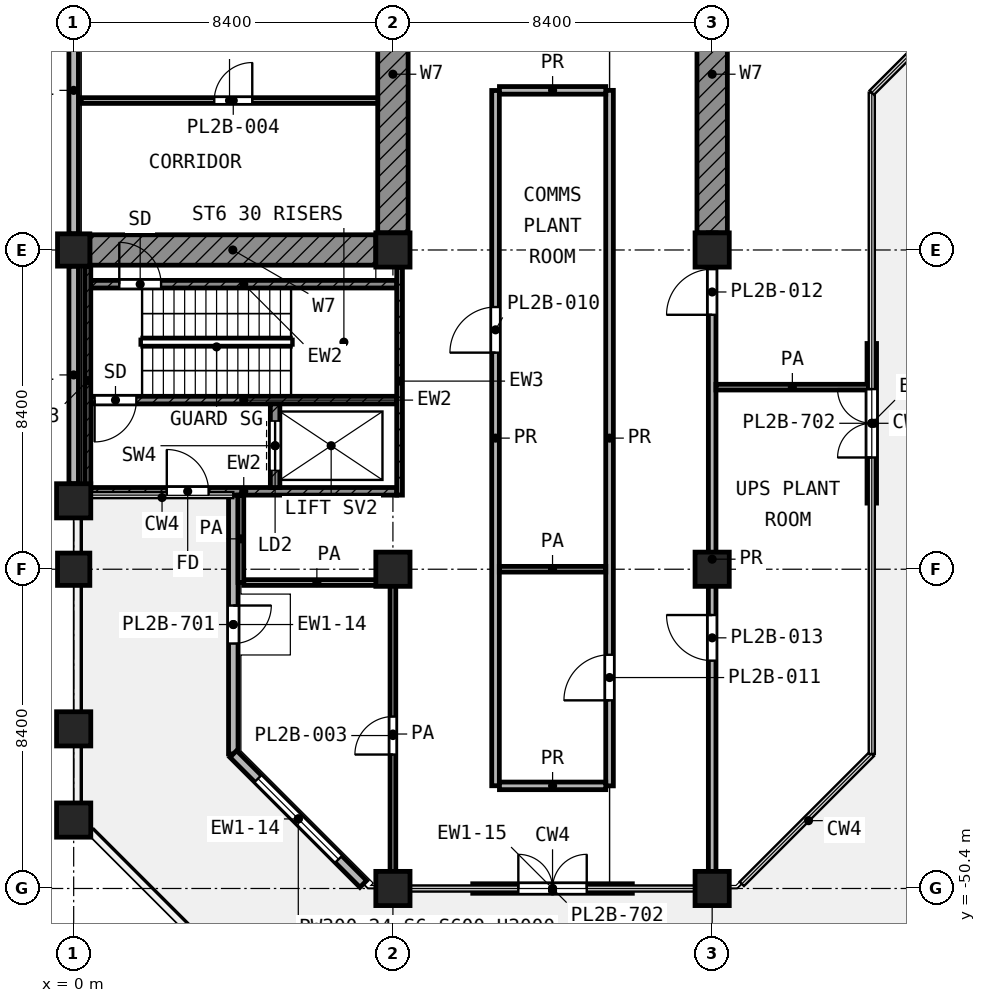
"""IFC4 building model, lengths in metres.
Left out: names, types, materials, properties, quantities, classifications, styles, units other than length and angle.
Written with IfcOpenShell. Run it as: python <this file> out.ifc"""

import sys

from ifc_helpers import new_model, si_unit, direction, frame, frame_2d, origin, origin_2d, place, context, subcontext, project, spatial, rectangle, extrude, element, fill, save


model = new_model("IFC4")
c1 = context("Model", 3, precision=1e-05, world=origin(), true_north=direction((0.0, 1.0)))
c2 = subcontext(c1, "Body", "Model", "MODEL_VIEW")
j1 = project(units=[si_unit("LENGTHUNIT", "METRE"), si_unit("PLANEANGLEUNIT", "RADIAN")], contexts=[c1])
p1 = place(None, origin())
s1 = spatial("IfcSite", under=j1, at=p1, CompositionType="ELEMENT")
p2 = place(p1, origin())
s2 = spatial("IfcBuilding", under=s1, at=p2, CompositionType="ELEMENT")
p3 = place(p2, frame((0.0, 0.0, 213.0)))
s3 = spatial("IfcBuildingStorey", under=s2, at=p3, CompositionType="ELEMENT", Elevation=213.0)
p4 = place(p3, frame((0.0, -33.6, 0.0), z_axis=(0.0, 0.0, 1.0), x_axis=(1.0, 0.0, 0.0)))
e1 = element("IfcColumn", 1, at=p4, inside=s3, PredefinedType="COLUMN", context=c2, shape_type="SweptSolid", body=[
    extrude(rectangle(XDim=0.85, YDim=0.85, at=origin_2d()), origin(), (0.0, 0.0, 1.0), 5.0),
])
for number, where, z_axis, x_axis in (
    (2, (8.4, -33.6, 0.0), (0.0, 0.0, 1.0), (1.0, 0.0, 0.0)),
    (3, (16.8, -33.6, 0.0), (0.0, 0.0, 1.0), (1.0, 0.0, 0.0)),
):
    element("IfcColumn", number, at=place(p3, frame(where, z_axis=z_axis, x_axis=x_axis)), inside=s3, PredefinedType="COLUMN", context=c2, shape_type="SweptSolid", body=[
        extrude(rectangle(XDim=0.9, YDim=0.9, at=origin_2d()), origin(), (0.0, 0.0, 1.0), 5.0),
    ])
p5 = place(p3, frame((0.0, -42.0, 0.0), z_axis=(0.0, 0.0, 1.0), x_axis=(1.0, 0.0, 0.0)))
e4 = element("IfcColumn", 4, at=p5, inside=s3, PredefinedType="COLUMN", context=c2, shape_type="SweptSolid", body=[
    extrude(rectangle(XDim=0.85, YDim=0.85, at=origin_2d()), origin(), (0.0, 0.0, 1.0), 5.0),
])
for number, where, z_axis, x_axis in (
    (5, (8.4, -42.0, 0.0), (0.0, 0.0, 1.0), (1.0, 0.0, 0.0)),
    (6, (16.8, -42.0, 0.0), (0.0, 0.0, 1.0), (1.0, 0.0, 0.0)),
    (7, (0.0, -48.6, 0.0), (0.0, 0.0, 1.0), (1.0, 0.0, 0.0)),
    (8, (8.4, -50.4, 0.0), (0.0, 0.0, 1.0), (1.0, 0.0, 0.0)),
    (9, (16.8, -50.4, 0.0), (0.0, 0.0, 1.0), (1.0, 0.0, 0.0)),
    (10, (0.0, -40.2, 0.0), (0.0, 0.0, 1.0), (1.0, 0.0, 0.0)),
    (11, (0.0, -46.2, 0.0), (0.0, 0.0, 1.0), (1.0, 0.0, 0.0)),
):
    element("IfcColumn", number, at=place(p3, frame(where, z_axis=z_axis, x_axis=x_axis)), inside=s3, PredefinedType="COLUMN", context=c2, shape_type="SweptSolid", body=[
        extrude(rectangle(XDim=0.9, YDim=0.9, at=origin_2d()), origin(), (0.0, 0.0, 1.0), 5.0),
    ])
for number, where, z_axis, x_axis in (
    (12, (8.4, -24.8, 0.0), (0.0, 0.0, 1.0), (0.0, -1.0, 0.0)),
    (13, (16.8, -24.8, 0.0), (0.0, 0.0, 1.0), (0.0, -1.0, 0.0)),
):
    element("IfcWall", number, at=place(p3, frame(where, z_axis=z_axis, x_axis=x_axis)), inside=s3, PredefinedType="SHEAR", context=c2, shape_type="SweptSolid", body=[
        extrude(rectangle(XDim=8.35, YDim=0.8, at=frame_2d((4.175, 0.0))), origin(), (0.0, 0.0, 1.0), 4.4),
    ])
p6 = place(p3, frame((0.425, -33.6, 0.0), z_axis=(0.0, 0.0, 1.0), x_axis=(1.0, 0.0, 0.0)))
e14 = element("IfcWall", 14, at=p6, inside=s3, PredefinedType="SHEAR", context=c2, shape_type="SweptSolid", body=[
    extrude(rectangle(XDim=7.525, YDim=0.8, at=frame_2d((3.762, 0.0))), origin(), (0.0, 0.0, 1.0), 4.4),
])
p7 = place(p3, frame((0.0, -25.625, 0.0), z_axis=(0.0, 0.0, 1.0), x_axis=(0.0, -1.0, 0.0)))
e15 = element("IfcWall", 15, at=p7, inside=s3, PredefinedType="SOLIDWALL", context=c2, shape_type="SweptSolid", body=[
    extrude(rectangle(XDim=7.55, YDim=0.25, at=frame_2d((3.775, 0.0))), origin(), (0.0, 0.0, 1.0), 3.2),
])
p8 = place(p3, frame((0.0, -34.025, 0.0), z_axis=(0.0, 0.0, 1.0), x_axis=(0.0, -1.0, 0.0)))
e16 = element("IfcWall", 16, at=p8, inside=s3, PredefinedType="SOLIDWALL", context=c2, shape_type="SweptSolid", body=[
    extrude(rectangle(XDim=5.725, YDim=0.25, at=frame_2d((2.863, 0.0))), origin(), (0.0, 0.0, 1.0), 3.2),
])
p9 = place(p3, frame((4.2, -40.05, 0.0), z_axis=(0.0, 0.0, 1.0), x_axis=(0.0, -1.0, 0.0)))
e17 = element("IfcWall", 17, at=p9, inside=s3, PredefinedType="SOLIDWALL", context=c2, shape_type="SweptSolid", body=[
    extrude(rectangle(XDim=6.81, YDim=0.25, at=frame_2d((3.405, 0.0))), origin(), (0.0, 0.0, 1.0), 4.4),
])
p10 = place(p9, frame((2.905, 0.0, 0.0)))
e18 = element("IfcOpeningElement", 18, at=p10, cuts=e17, PredefinedType="OPENING", context=c2, shape_type="SweptSolid", body=[
    extrude(rectangle(XDim=1.0, YDim=2.1, at=frame_2d((0.5, 1.05))), frame((0.0, 0.135, 0.0), z_axis=(0.0, -1.0, 0.0), x_axis=(1.0, 0.0, 0.0)), (0.0, 0.0, 1.0), 0.27),
])
p11 = place(p3, frame((4.2, -46.86, 0.0), z_axis=(0.0, 0.0, 1.0), x_axis=(0.707132019226, -0.707081542246, 0.0)))
e19 = element("IfcWall", 19, at=p11, inside=s3, PredefinedType="SOLIDWALL", context=c2, shape_type="SweptSolid", body=[
    extrude(rectangle(XDim=4.837, YDim=0.25, at=frame_2d((2.418, 0.0))), origin(), (0.0, 0.0, 1.0), 4.4),
])
p12 = place(p11, frame((0.918, 0.0, 0.6)))
e20 = element("IfcOpeningElement", 20, at=p12, cuts=e19, PredefinedType="OPENING", context=c2, shape_type="SweptSolid", body=[
    extrude(rectangle(XDim=3.0, YDim=2.4, at=frame_2d((1.5, 1.2))), frame((0.0, 0.135, 0.0), z_axis=(0.0, -1.0, 0.0), x_axis=(1.0, 0.0, 0.0)), (0.0, 0.0, 1.0), 0.27),
])
p13 = place(p3, frame((10.5, -50.401, 0.0), z_axis=(0.0, 0.0, 1.0), x_axis=(1.0, 0.0, 0.0)))
e21 = element("IfcWall", 21, at=p13, inside=s3, PredefinedType="SOLIDWALL", context=c2, shape_type="SweptSolid", body=[
    extrude(rectangle(XDim=4.2, YDim=0.25, at=frame_2d((2.1, 0.0))), origin(), (0.0, 0.0, 1.0), 4.24),
])
p14 = place(p13, frame((1.2, 0.0, 0.0)))
e22 = element("IfcOpeningElement", 22, at=p14, cuts=e21, PredefinedType="OPENING", context=c2, shape_type="SweptSolid", body=[
    extrude(rectangle(XDim=1.8, YDim=2.1, at=frame_2d((0.9, 1.05))), frame((0.0, 0.135, 0.0), z_axis=(0.0, -1.0, 0.0), x_axis=(1.0, 0.0, 0.0)), (0.0, 0.0, 1.0), 0.27),
])
p15 = place(p3, frame((21.0, -40.26, 0.0), z_axis=(0.0, 0.0, 1.0), x_axis=(0.0, 1.0, 0.0)))
e23 = element("IfcWall", 23, at=p15, inside=s3, PredefinedType="SOLIDWALL", context=c2, shape_type="SweptSolid", body=[
    extrude(rectangle(XDim=4.2, YDim=0.25, at=frame_2d((2.1, 0.0))), origin(), (0.0, 0.0, 1.0), 4.24),
])
p16 = place(p15, frame((1.2, 0.0, 0.0)))
e24 = element("IfcOpeningElement", 24, at=p16, cuts=e23, PredefinedType="OPENING", context=c2, shape_type="SweptSolid", body=[
    extrude(rectangle(XDim=1.8, YDim=2.1, at=frame_2d((0.9, 1.05))), frame((0.0, 0.135, 0.0), z_axis=(0.0, -1.0, 0.0), x_axis=(1.0, 0.0, 0.0)), (0.0, 0.0, 1.0), 0.27),
])
p17 = place(p3, frame((0.375, -40.05, 0.0), z_axis=(0.0, 0.0, 1.0), x_axis=(0.0, 1.0, 0.0)))
e25 = element("IfcWall", 25, at=p17, inside=s3, PredefinedType="SHEAR", context=c2, shape_type="SweptSolid", body=[
    extrude(rectangle(XDim=6.025, YDim=0.15, at=frame_2d((3.013, 0.0))), origin(), (0.0, 0.0, 1.0), 4.4),
])
p18 = place(p3, frame((8.575, -40.05, 0.0), z_axis=(0.0, 0.0, 1.0), x_axis=(0.0, 1.0, 0.0)))
e26 = element("IfcWall", 26, at=p18, inside=s3, PredefinedType="SHEAR", context=c2, shape_type="SweptSolid", body=[
    extrude(rectangle(XDim=6.0, YDim=0.15, at=frame_2d((3.0, 0.0))), origin(), (0.0, 0.0, 1.0), 4.4),
])
p19 = place(p3, frame((0.45, -34.5, 0.0), z_axis=(0.0, 0.0, 1.0), x_axis=(1.0, 0.0, 0.0)))
e27 = element("IfcWall", 27, at=p19, inside=s3, PredefinedType="SHEAR", context=c2, shape_type="SweptSolid", body=[
    extrude(rectangle(XDim=8.05, YDim=0.2, at=frame_2d((4.025, 0.0))), origin(), (0.0, 0.0, 1.0), 4.4),
])
p20 = place(p19, frame((0.75, 0.0, 0.0)))
e28 = element("IfcOpeningElement", 28, at=p20, cuts=e27, PredefinedType="OPENING", context=c2, shape_type="SweptSolid", body=[
    extrude(rectangle(XDim=1.1, YDim=2.1, at=frame_2d((0.55, 1.05))), frame((0.0, 0.11, 0.0), z_axis=(0.0, -1.0, 0.0), x_axis=(1.0, 0.0, 0.0)), (0.0, 0.0, 1.0), 0.22),
])
p21 = place(p3, frame((0.45, -37.55, 0.0), z_axis=(0.0, 0.0, 1.0), x_axis=(1.0, 0.0, 0.0)))
e29 = element("IfcWall", 29, at=p21, inside=s3, PredefinedType="SHEAR", context=c2, shape_type="SweptSolid", body=[
    extrude(rectangle(XDim=8.05, YDim=0.2, at=frame_2d((4.025, 0.0))), origin(), (0.0, 0.0, 1.0), 4.4),
])
p22 = place(p21, frame((0.1, 0.0, 0.0)))
e30 = element("IfcOpeningElement", 30, at=p22, cuts=e29, PredefinedType="OPENING", context=c2, shape_type="SweptSolid", body=[
    extrude(rectangle(XDim=1.1, YDim=2.1, at=frame_2d((0.55, 1.05))), frame((0.0, 0.11, 0.0), z_axis=(0.0, -1.0, 0.0), x_axis=(1.0, 0.0, 0.0)), (0.0, 0.0, 1.0), 0.22),
])
p23 = place(p3, frame((0.45, -39.95, 0.0), z_axis=(0.0, 0.0, 1.0), x_axis=(1.0, 0.0, 0.0)))
e31 = element("IfcWall", 31, at=p23, inside=s3, PredefinedType="SHEAR", context=c2, shape_type="SweptSolid", body=[
    extrude(rectangle(XDim=8.05, YDim=0.2, at=frame_2d((4.025, 0.0))), origin(), (0.0, 0.0, 1.0), 4.4),
])
p24 = place(p23, frame((2.0, 0.0, 0.0)))
e32 = element("IfcOpeningElement", 32, at=p24, cuts=e31, PredefinedType="OPENING", context=c2, shape_type="SweptSolid", body=[
    extrude(rectangle(XDim=1.1, YDim=2.1, at=frame_2d((0.55, 1.05))), frame((0.0, 0.11, 0.0), z_axis=(0.0, -1.0, 0.0), x_axis=(1.0, 0.0, 0.0)), (0.0, 0.0, 1.0), 0.22),
])
p25 = place(p3, frame((5.3, -39.85, 0.0), z_axis=(0.0, 0.0, 1.0), x_axis=(0.0, 1.0, 0.0)))
e33 = element("IfcWall", 33, at=p25, inside=s3, PredefinedType="SHEAR", context=c2, shape_type="SweptSolid", body=[
    extrude(rectangle(XDim=2.2, YDim=0.25, at=frame_2d((1.1, 0.0))), origin(), (0.0, 0.0, 1.0), 4.4),
])
p26 = place(p25, frame((0.45, 0.0, 0.0)))
e34 = element("IfcOpeningElement", 34, at=p26, cuts=e33, PredefinedType="OPENING", context=c2, shape_type="SweptSolid", body=[
    extrude(rectangle(XDim=1.3, YDim=2.1, at=frame_2d((0.65, 1.05))), frame((0.0, 0.135, 0.0), z_axis=(0.0, -1.0, 0.0), x_axis=(1.0, 0.0, 0.0)), (0.0, 0.0, 1.0), 0.27),
])
p27 = place(p3, frame((4.475, -42.35, 0.0), z_axis=(0.0, 0.0, 1.0), x_axis=(1.0, 0.0, 0.0)))
e35 = element("IfcWall", 35, at=p27, inside=s3, PredefinedType="PARTITIONING", context=c2, shape_type="SweptSolid", body=[
    extrude(rectangle(XDim=3.848, YDim=0.15, at=frame_2d((1.924, 0.0))), origin(), (0.0, 0.0, 1.0), 4.4),
])
p28 = place(p3, frame((11.2, -42.0, 0.0), z_axis=(0.0, 0.0, 1.0), x_axis=(1.0, 0.0, 0.0)))
e36 = element("IfcWall", 36, at=p28, inside=s3, PredefinedType="PARTITIONING", context=c2, shape_type="SweptSolid", body=[
    extrude(rectangle(XDim=2.8, YDim=0.15, at=frame_2d((1.4, 0.0))), origin(), (0.0, 0.0, 1.0), 4.4),
])
p29 = place(p3, frame((16.9, -37.209, 0.0), z_axis=(0.0, 0.0, 1.0), x_axis=(1.0, 0.0, 0.0)))
e37 = element("IfcWall", 37, at=p29, inside=s3, PredefinedType="PARTITIONING", context=c2, shape_type="SweptSolid", body=[
    extrude(rectangle(XDim=4.02, YDim=0.15, at=frame_2d((2.01, 0.0))), origin(), (0.0, 0.0, 1.0), 4.4),
])
p30 = place(p3, frame((0.2, -29.668, 0.0), z_axis=(0.0, 0.0, 1.0), x_axis=(1.0, 0.0, 0.0)))
e38 = element("IfcWall", 38, at=p30, inside=s3, PredefinedType="PARTITIONING", context=c2, shape_type="SweptSolid", body=[
    extrude(rectangle(XDim=7.801, YDim=0.15, at=frame_2d((3.9, 0.0))), origin(), (0.0, 0.0, 1.0), 3.2),
])
p31 = place(p30, frame((3.499, 0.0, 0.0)))
e39 = element("IfcOpeningElement", 39, at=p31, cuts=e38, PredefinedType="OPENING", context=c2, shape_type="SweptSolid", body=[
    extrude(rectangle(XDim=1.0, YDim=2.1, at=frame_2d((0.5, 1.05))), frame((0.0, 0.085, 0.0), z_axis=(0.0, -1.0, 0.0), x_axis=(1.0, 0.0, 0.0)), (0.0, 0.0, 1.0), 0.17),
])
p32 = place(p3, frame((4.4, -42.35, 0.0), z_axis=(0.0, 0.0, 1.0), x_axis=(0.0, 1.0, 0.0)))
e40 = element("IfcWall", 40, at=p32, inside=s3, PredefinedType="PARTITIONING", context=c2, shape_type="SweptSolid", body=[
    extrude(rectangle(XDim=2.299, YDim=0.15, at=frame_2d((1.149, 0.0))), origin(), (0.0, 0.0, 1.0), 4.4),
])
p33 = place(p3, frame((8.4, -50.321, 0.0), z_axis=(0.0, 0.0, 1.0), x_axis=(0.0, 1.0, 0.0)))
e41 = element("IfcWall", 41, at=p33, inside=s3, PredefinedType="PARTITIONING", context=c2, shape_type="SweptSolid", body=[
    extrude(rectangle(XDim=7.97, YDim=0.15, at=frame_2d((3.985, 0.0))), origin(), (0.0, 0.0, 1.0), 4.4),
])
p34 = place(p33, frame((3.445, 0.0, 0.0)))
e42 = element("IfcOpeningElement", 42, at=p34, cuts=e41, PredefinedType="OPENING", context=c2, shape_type="SweptSolid", body=[
    extrude(rectangle(XDim=1.0, YDim=2.1, at=frame_2d((0.5, 1.05))), frame((0.0, 0.085, 0.0), z_axis=(0.0, -1.0, 0.0), x_axis=(1.0, 0.0, 0.0)), (0.0, 0.0, 1.0), 0.17),
])
for number, where, z_axis, x_axis in (
    (43, (11.203, -47.7, 0.0), (0.0, 0.0, 1.0), (1.0, 0.0, 0.0)),
    (44, (11.203, -29.4, 0.0), (0.0, 0.0, 1.0), (1.0, 0.0, 0.0)),
):
    element("IfcWall", number, at=place(p3, frame(where, z_axis=z_axis, x_axis=x_axis)), inside=s3, PredefinedType="PARTITIONING", context=c2, shape_type="SweptSolid", body=[
        extrude(rectangle(XDim=2.797, YDim=0.2, at=frame_2d((1.398, 0.0))), origin(), (0.0, 0.0, 1.0), 4.4),
    ])
p35 = place(p3, frame((11.1, -47.697, 0.0), z_axis=(0.0, 0.0, 1.0), x_axis=(0.0, 1.0, 0.0)))
e45 = element("IfcWall", 45, at=p35, inside=s3, PredefinedType="PARTITIONING", context=c2, shape_type="SweptSolid", body=[
    extrude(rectangle(XDim=18.294, YDim=0.2, at=frame_2d((9.147, 0.0))), origin(), (0.0, 0.0, 1.0), 4.4),
])
p36 = place(p35, frame((11.396, 0.0, 0.0)))
e46 = element("IfcOpeningElement", 46, at=p36, cuts=e45, PredefinedType="OPENING", context=c2, shape_type="SweptSolid", body=[
    extrude(rectangle(XDim=1.2, YDim=2.1, at=frame_2d((0.6, 1.05))), frame((0.0, 0.11, 0.0), z_axis=(0.0, -1.0, 0.0), x_axis=(1.0, 0.0, 0.0)), (0.0, 0.0, 1.0), 0.22),
])
p37 = place(p3, frame((14.1, -47.7, 0.0), z_axis=(0.0, 0.0, 1.0), x_axis=(0.0, 1.0, 0.0)))
e47 = element("IfcWall", 47, at=p37, inside=s3, PredefinedType="PARTITIONING", context=c2, shape_type="SweptSolid", body=[
    extrude(rectangle(XDim=18.3, YDim=0.2, at=frame_2d((9.15, 0.0))), origin(), (0.0, 0.0, 1.0), 4.4),
])
p38 = place(p37, frame((2.25, 0.0, 0.0)))
e48 = element("IfcOpeningElement", 48, at=p38, cuts=e47, PredefinedType="OPENING", context=c2, shape_type="SweptSolid", body=[
    extrude(rectangle(XDim=1.2, YDim=2.1, at=frame_2d((0.6, 1.05))), frame((0.0, 0.11, 0.0), z_axis=(0.0, -1.0, 0.0), x_axis=(1.0, 0.0, 0.0)), (0.0, 0.0, 1.0), 0.22),
])
p39 = place(p3, frame((16.8, -50.321, 0.0), z_axis=(0.0, 0.0, 1.0), x_axis=(0.0, 1.0, 0.0)))
e49 = element("IfcWall", 49, at=p39, inside=s3, PredefinedType="PARTITIONING", context=c2, shape_type="SweptSolid", body=[
    extrude(rectangle(XDim=17.171, YDim=0.2, at=frame_2d((8.585, 0.0))), origin(), (0.0, 0.0, 1.0), 4.4),
])
p40 = place(p39, frame((15.016, 0.0, 0.0)))
e50 = element("IfcOpeningElement", 50, at=p40, cuts=e49, PredefinedType="OPENING", context=c2, shape_type="SweptSolid", body=[
    extrude(rectangle(XDim=1.2, YDim=2.1, at=frame_2d((0.6, 1.05))), frame((0.0, 0.11, 0.0), z_axis=(0.0, -1.0, 0.0), x_axis=(1.0, 0.0, 0.0)), (0.0, 0.0, 1.0), 0.22),
])
p41 = place(p39, frame((5.916, 0.0, 0.0)))
e51 = element("IfcOpeningElement", 51, at=p41, cuts=e49, PredefinedType="OPENING", context=c2, shape_type="SweptSolid", body=[
    extrude(rectangle(XDim=1.2, YDim=2.1, at=frame_2d((0.6, 1.05))), frame((0.0, 0.11, 0.0), z_axis=(0.0, -1.0, 0.0), x_axis=(1.0, 0.0, 0.0)), (0.0, 0.0, 1.0), 0.22),
])
p42 = place(p10, origin())
e52 = element("IfcDoor", 52, at=p42, inside=s3, OperationType="SINGLE_SWING_LEFT", PredefinedType="DOOR", context=c2, shape_type="SweptSolid", body=[
    extrude(rectangle(XDim=1.0, YDim=2.1, at=frame_2d((0.5, 1.05))), frame((0.0, 0.025, 0.0), z_axis=(0.0, -1.0, 0.0), x_axis=(1.0, 0.0, 0.0)), (0.0, 0.0, 1.0), 0.05),
])
fill(e18, e52)
p43 = place(p12, origin())
e53 = element("IfcWindow", 53, at=p43, inside=s3, PartitioningType="SINGLE_PANEL", PredefinedType="WINDOW", context=c2, shape_type="SweptSolid", body=[
    extrude(rectangle(XDim=3.0, YDim=2.4, at=frame_2d((1.5, 1.2))), frame((0.0, 0.03, 0.0), z_axis=(0.0, -1.0, 0.0), x_axis=(1.0, 0.0, 0.0)), (0.0, 0.0, 1.0), 0.06),
])
fill(e20, e53)
p44 = place(p14, origin())
e54 = element("IfcDoor", 54, at=p44, inside=s3, OperationType="DOUBLE_DOOR_SINGLE_SWING", PredefinedType="DOOR", context=c2, shape_type="SweptSolid", body=[
    extrude(rectangle(XDim=1.8, YDim=2.1, at=frame_2d((0.9, 1.05))), frame((0.0, 0.025, 0.0), z_axis=(0.0, -1.0, 0.0), x_axis=(1.0, 0.0, 0.0)), (0.0, 0.0, 1.0), 0.05),
])
fill(e22, e54)
p45 = place(p16, origin())
e55 = element("IfcDoor", 55, at=p45, inside=s3, OperationType="DOUBLE_DOOR_SINGLE_SWING", PredefinedType="DOOR", context=c2, shape_type="SweptSolid", body=[
    extrude(rectangle(XDim=1.8, YDim=2.1, at=frame_2d((0.9, 1.05))), frame((0.0, 0.025, 0.0), z_axis=(0.0, -1.0, 0.0), x_axis=(1.0, 0.0, 0.0)), (0.0, 0.0, 1.0), 0.05),
])
fill(e24, e55)
p46 = place(p20, origin())
e56 = element("IfcDoor", 56, at=p46, inside=s3, OperationType="SINGLE_SWING_LEFT", PredefinedType="DOOR", context=c2, shape_type="SweptSolid", body=[
    extrude(rectangle(XDim=1.1, YDim=2.1, at=frame_2d((0.55, 1.05))), frame((0.0, 0.025, 0.0), z_axis=(0.0, -1.0, 0.0), x_axis=(1.0, 0.0, 0.0)), (0.0, 0.0, 1.0), 0.05),
])
fill(e28, e56)
p47 = place(p22, frame((1.1, 0.0, 0.0), z_axis=(0.0, 0.0, 1.0), x_axis=(-1.0, 0.0, 0.0)))
e57 = element("IfcDoor", 57, at=p47, inside=s3, OperationType="SINGLE_SWING_LEFT", PredefinedType="DOOR", context=c2, shape_type="SweptSolid", body=[
    extrude(rectangle(XDim=1.1, YDim=2.1, at=frame_2d((0.55, 1.05))), frame((0.0, 0.025, 0.0), z_axis=(0.0, -1.0, 0.0), x_axis=(1.0, 0.0, 0.0)), (0.0, 0.0, 1.0), 0.05),
])
fill(e30, e57)
p48 = place(p26, origin())
e58 = element("IfcDoor", 58, at=p48, inside=s3, OperationType="DOUBLE_DOOR_SLIDING", PredefinedType="DOOR", context=c2, shape_type="SweptSolid", body=[
    extrude(rectangle(XDim=1.3, YDim=2.1, at=frame_2d((0.65, 1.05))), frame((0.0, 0.025, 0.0), z_axis=(0.0, -1.0, 0.0), x_axis=(1.0, 0.0, 0.0)), (0.0, 0.0, 1.0), 0.05),
])
fill(e34, e58)
p49 = place(p24, origin())
e59 = element("IfcDoor", 59, at=p49, inside=s3, OperationType="SINGLE_SWING_LEFT", PredefinedType="DOOR", context=c2, shape_type="SweptSolid", body=[
    extrude(rectangle(XDim=1.1, YDim=2.1, at=frame_2d((0.55, 1.05))), frame((0.0, 0.025, 0.0), z_axis=(0.0, -1.0, 0.0), x_axis=(1.0, 0.0, 0.0)), (0.0, 0.0, 1.0), 0.05),
])
fill(e32, e59)
p50 = place(p34, origin())
e60 = element("IfcDoor", 60, at=p50, inside=s3, OperationType="SINGLE_SWING_LEFT", PredefinedType="DOOR", context=c2, shape_type="SweptSolid", body=[
    extrude(rectangle(XDim=1.0, YDim=2.1, at=frame_2d((0.5, 1.05))), frame((0.0, 0.025, 0.0), z_axis=(0.0, -1.0, 0.0), x_axis=(1.0, 0.0, 0.0)), (0.0, 0.0, 1.0), 0.05),
])
fill(e42, e60)
p51 = place(p36, origin())
e61 = element("IfcDoor", 61, at=p51, inside=s3, OperationType="SINGLE_SWING_LEFT", PredefinedType="DOOR", context=c2, shape_type="SweptSolid", body=[
    extrude(rectangle(XDim=1.2, YDim=2.1, at=frame_2d((0.6, 1.05))), frame((0.0, 0.025, 0.0), z_axis=(0.0, -1.0, 0.0), x_axis=(1.0, 0.0, 0.0)), (0.0, 0.0, 1.0), 0.05),
])
fill(e46, e61)
p52 = place(p38, origin())
e62 = element("IfcDoor", 62, at=p52, inside=s3, OperationType="SINGLE_SWING_LEFT", PredefinedType="DOOR", context=c2, shape_type="SweptSolid", body=[
    extrude(rectangle(XDim=1.2, YDim=2.1, at=frame_2d((0.6, 1.05))), frame((0.0, 0.025, 0.0), z_axis=(0.0, -1.0, 0.0), x_axis=(1.0, 0.0, 0.0)), (0.0, 0.0, 1.0), 0.05),
])
fill(e48, e62)
p53 = place(p40, origin())
e63 = element("IfcDoor", 63, at=p53, inside=s3, OperationType="SINGLE_SWING_LEFT", PredefinedType="DOOR", context=c2, shape_type="SweptSolid", body=[
    extrude(rectangle(XDim=1.2, YDim=2.1, at=frame_2d((0.6, 1.05))), frame((0.0, 0.025, 0.0), z_axis=(0.0, -1.0, 0.0), x_axis=(1.0, 0.0, 0.0)), (0.0, 0.0, 1.0), 0.05),
])
fill(e50, e63)
p54 = place(p41, origin())
e64 = element("IfcDoor", 64, at=p54, inside=s3, OperationType="SINGLE_SWING_RIGHT", PredefinedType="DOOR", context=c2, shape_type="SweptSolid", body=[
    extrude(rectangle(XDim=1.2, YDim=2.1, at=frame_2d((0.6, 1.05))), frame((0.0, 0.025, 0.0), z_axis=(0.0, -1.0, 0.0), x_axis=(1.0, 0.0, 0.0)), (0.0, 0.0, 1.0), 0.05),
])
fill(e51, e64)
p55 = place(p31, origin())
e65 = element("IfcDoor", 65, at=p55, inside=s3, OperationType="SINGLE_SWING_RIGHT", PredefinedType="DOOR", context=c2, shape_type="SweptSolid", body=[
    extrude(rectangle(XDim=1.0, YDim=2.1, at=frame_2d((0.5, 1.05))), frame((0.0, 0.025, 0.0), z_axis=(0.0, -1.0, 0.0), x_axis=(1.0, 0.0, 0.0)), (0.0, 0.0, 1.0), 0.05),
])
fill(e39, e65)
save(model, sys.argv[1])
